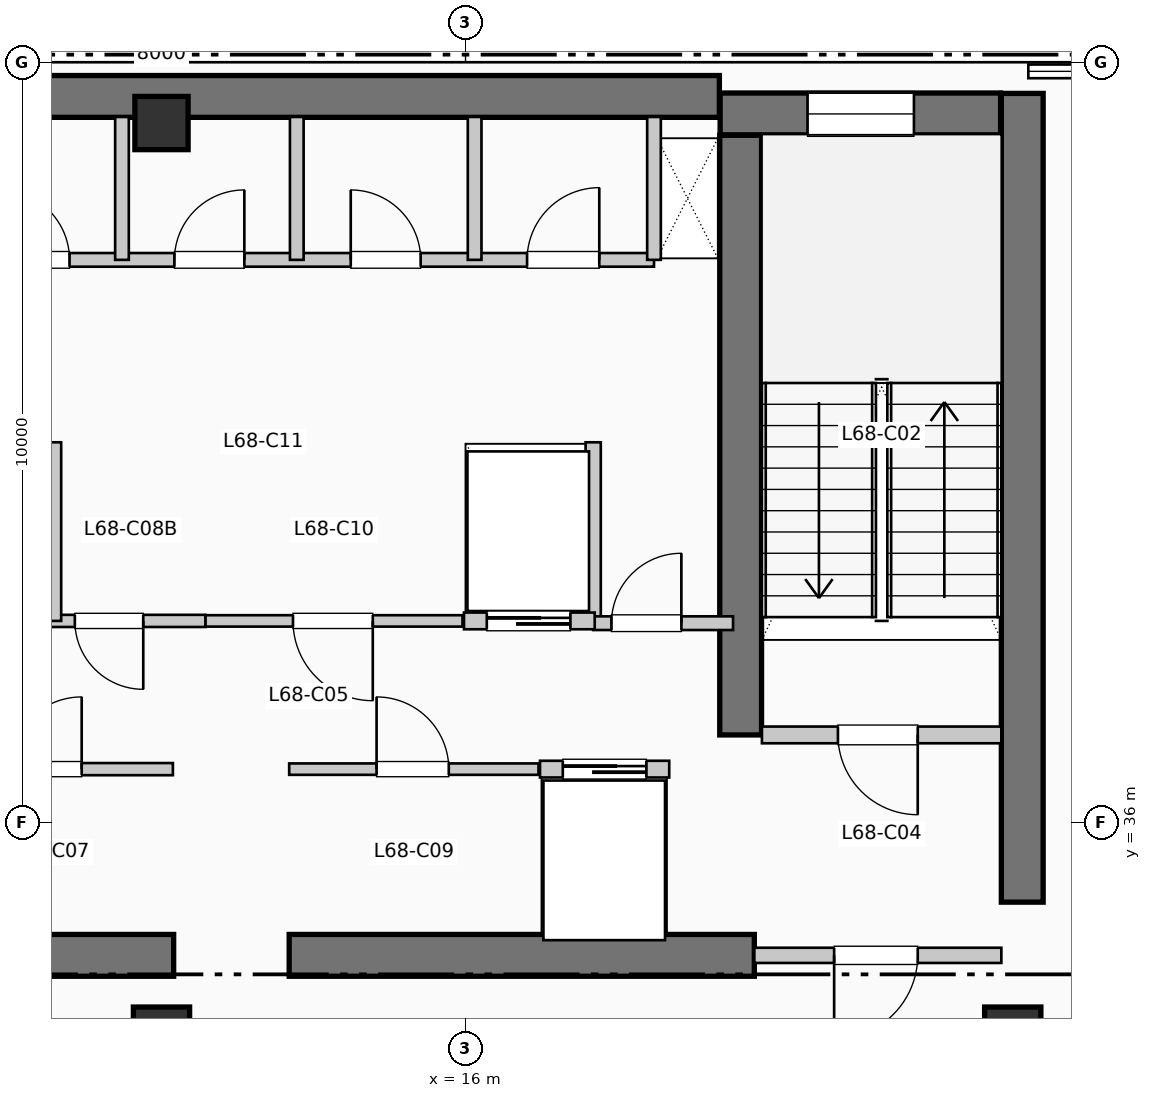
"""IFC4 building model, lengths in metres.
Left out: names, types, materials, properties, quantities, classifications, styles, units other than length and angle.
Written with IfcOpenShell. Run it as: python <this file> out.ifc"""

import sys

from ifc_helpers import new_model, si_unit, direction, frame, frame_2d, origin, origin_2d, place, context, subcontext, project, spatial, rectangle, extrude, element, fill, save


model = new_model("IFC4")
c1 = context("Model", 3, precision=1e-05, world=origin(), true_north=direction((0.0, 1.0)))
c2 = subcontext(c1, "Body", "Model", "MODEL_VIEW")
j1 = project(units=[si_unit("LENGTHUNIT", "METRE"), si_unit("PLANEANGLEUNIT", "RADIAN")], contexts=[c1])
p1 = place(None, origin())
s1 = spatial("IfcSite", under=j1, at=p1, CompositionType="ELEMENT")
p2 = place(p1, origin())
s2 = spatial("IfcBuilding", under=s1, at=p2, CompositionType="ELEMENT")
p3 = place(p2, frame((0.0, 0.0, 280.17)))
s3 = spatial("IfcBuildingStorey", under=s2, at=p3, CompositionType="ELEMENT", Elevation=280.17)
p4 = place(p3, frame((5.36, 45.55, 0.0), z_axis=(0.0, 0.0, 1.0), x_axis=(1.0, 0.0, 0.0)))
e1 = element("IfcWall", 1, at=p4, inside=s3, PredefinedType="SHEAR", context=c2, shape_type="SweptSolid", body=[
    extrude(rectangle(XDim=13.98, YDim=0.55, at=frame_2d((6.99, 0.0))), origin(), (0.0, 0.0, 1.0), 3.96),
])
p5 = place(p3, frame((23.325, 34.95, 0.0), z_axis=(0.0, 0.0, 1.0), x_axis=(0.0, 1.0, 0.0)))
e2 = element("IfcWall", 2, at=p5, inside=s3, PredefinedType="SHEAR", context=c2, shape_type="SweptSolid", body=[
    extrude(rectangle(XDim=10.64, YDim=0.55, at=frame_2d((5.32, 0.0))), origin(), (0.0, 0.0, 1.0), 3.96),
])
p6 = place(p3, frame((1.45, 34.25, 0.0), z_axis=(0.0, 0.0, 1.0), x_axis=(1.0, 0.0, 0.0)))
e3 = element("IfcWall", 3, at=p6, inside=s3, PredefinedType="SHEAR", context=c2, shape_type="SweptSolid", body=[
    extrude(rectangle(XDim=10.71, YDim=0.55, at=frame_2d((5.355, 0.0))), origin(), (0.0, 0.0, 1.0), 3.96),
])
p7 = place(p6, frame((7.25, 0.0, 0.0), z_axis=(0.0, 0.0, 1.0), x_axis=(-1.0, 0.0, 0.0)))
e4 = element("IfcOpeningElement", 4, at=p7, cuts=e3, PredefinedType="OPENING", context=c2, shape_type="SweptSolid", body=[
    extrude(rectangle(XDim=1.1, YDim=2.15, at=frame_2d((0.55, 1.075))), frame((0.0, 0.285, 0.0), z_axis=(0.0, -1.0, 0.0), x_axis=(1.0, 0.0, 0.0)), (0.0, 0.0, 1.0), 0.57),
])
p8 = place(p3, frame((13.68, 34.25, 0.0), z_axis=(0.0, 0.0, 1.0), x_axis=(1.0, 0.0, 0.0)))
e5 = element("IfcWall", 5, at=p8, inside=s3, PredefinedType="SHEAR", context=c2, shape_type="SweptSolid", body=[
    extrude(rectangle(XDim=6.12, YDim=0.55, at=frame_2d((3.06, 0.0))), origin(), (0.0, 0.0, 1.0), 3.96),
])
p9 = place(p3, frame((19.62, 37.15, 0.0), z_axis=(0.0, 0.0, 1.0), x_axis=(0.0, 1.0, 0.0)))
e6 = element("IfcWall", 6, at=p9, inside=s3, PredefinedType="SHEAR", context=c2, shape_type="SweptSolid", body=[
    extrude(rectangle(XDim=7.89, YDim=0.55, at=frame_2d((3.945, 0.0))), origin(), (0.0, 0.0, 1.0), 3.96),
])
p10 = place(p3, frame((19.35, 45.32, 0.0), z_axis=(0.0, 0.0, 1.0), x_axis=(1.0, 0.0, 0.0)))
e7 = element("IfcWall", 7, at=p10, inside=s3, PredefinedType="SHEAR", context=c2, shape_type="SweptSolid", body=[
    extrude(rectangle(XDim=3.69, YDim=0.55, at=frame_2d((1.845, 0.0))), origin(), (0.0, 0.0, 1.0), 3.96),
])
p11 = place(p10, frame((1.15, 0.0, 1.05)))
e8 = element("IfcOpeningElement", 8, at=p11, cuts=e7, PredefinedType="OPENING", context=c2, shape_type="SweptSolid", body=[
    extrude(rectangle(XDim=1.4, YDim=1.8, at=frame_2d((0.7, 0.9))), frame((0.0, 0.285, 0.0), z_axis=(0.0, -1.0, 0.0), x_axis=(1.0, 0.0, 0.0)), (0.0, 0.0, 1.0), 0.57),
])
p12 = place(p3, frame((12.0, 33.2, 0.0), z_axis=(0.0, 0.0, 1.0), x_axis=(1.0, 0.0, 0.0)))
e9 = element("IfcColumn", 9, at=p12, inside=s3, PredefinedType="COLUMN", context=c2, shape_type="SweptSolid", body=[
    extrude(rectangle(XDim=0.74, YDim=0.74, at=origin_2d()), origin(), (0.0, 0.0, 1.0), 3.96),
])
p13 = place(p3, frame((12.0, 45.2, 0.0), z_axis=(0.0, 0.0, 1.0), x_axis=(1.0, 0.0, 0.0)))
e10 = element("IfcColumn", 10, at=p13, inside=s3, PredefinedType="COLUMN", context=c2, shape_type="SweptSolid", body=[
    extrude(rectangle(XDim=0.7, YDim=0.7, at=origin_2d()), origin(), (0.0, 0.0, 1.0), 3.96),
])
p14 = place(p3, frame((23.2, 33.2, 0.0), z_axis=(0.0, 0.0, 1.0), x_axis=(1.0, 0.0, 0.0)))
e11 = element("IfcColumn", 11, at=p14, inside=s3, PredefinedType="COLUMN", context=c2, shape_type="SweptSolid", body=[
    extrude(rectangle(XDim=0.74, YDim=0.74, at=origin_2d()), origin(), (0.0, 0.0, 1.0), 3.96),
])
p15 = place(p3, frame((19.9, 37.15, 0.0), z_axis=(0.0, 0.0, 1.0), x_axis=(1.0, 0.0, 0.0)))
e12 = element("IfcWall", 12, at=p15, inside=s3, PredefinedType="PARTITIONING", context=c2, shape_type="SweptSolid", body=[
    extrude(rectangle(XDim=3.15, YDim=0.22, at=frame_2d((1.575, 0.0))), origin(), (0.0, 0.0, 1.0), 3.74),
])
p16 = place(p15, frame((2.05, 0.0, 0.0), z_axis=(0.0, 0.0, 1.0), x_axis=(-1.0, 0.0, 0.0)))
e13 = element("IfcOpeningElement", 13, at=p16, cuts=e12, PredefinedType="OPENING", context=c2, shape_type="SweptSolid", body=[
    extrude(rectangle(XDim=1.05, YDim=2.15, at=frame_2d((0.525, 1.075))), frame((0.0, 0.12, 0.0), z_axis=(0.0, -1.0, 0.0), x_axis=(1.0, 0.0, 0.0)), (0.0, 0.0, 1.0), 0.24),
])
p17 = place(p3, frame((19.8, 34.25, 0.0), z_axis=(0.0, 0.0, 1.0), x_axis=(1.0, 0.0, 0.0)))
e14 = element("IfcWall", 14, at=p17, inside=s3, PredefinedType="PARTITIONING", context=c2, shape_type="SweptSolid", body=[
    extrude(rectangle(XDim=3.25, YDim=0.2, at=frame_2d((1.625, 0.0))), origin(), (0.0, 0.0, 1.0), 3.74),
])
p18 = place(p17, frame((2.15, 0.0, 0.0), z_axis=(0.0, 0.0, 1.0), x_axis=(-1.0, 0.0, 0.0)))
e15 = element("IfcOpeningElement", 15, at=p18, cuts=e14, PredefinedType="OPENING", context=c2, shape_type="SweptSolid", body=[
    extrude(rectangle(XDim=1.1, YDim=2.15, at=frame_2d((0.55, 1.075))), frame((0.0, 0.11, 0.0), z_axis=(0.0, -1.0, 0.0), x_axis=(1.0, 0.0, 0.0)), (0.0, 0.0, 1.0), 0.22),
])
p19 = place(p3, frame((17.68, 38.65, 0.0), z_axis=(0.0, 0.0, 1.0), x_axis=(0.0, 1.0, 0.0)))
e16 = element("IfcWall", 16, at=p19, inside=s3, PredefinedType="PARTITIONING", context=c2, shape_type="SweptSolid", body=[
    extrude(rectangle(XDim=2.35, YDim=0.2, at=frame_2d((1.175, 0.0))), origin(), (0.0, 0.0, 1.0), 3.74),
])
p20 = place(p3, frame((17.68, 38.62, 0.0), z_axis=(0.0, 0.0, 1.0), x_axis=(1.0, 0.0, 0.0)))
e17 = element("IfcWall", 17, at=p20, inside=s3, PredefinedType="PARTITIONING", context=c2, shape_type="SweptSolid", body=[
    extrude(rectangle(XDim=1.84, YDim=0.18, at=frame_2d((0.92, 0.0))), origin(), (0.0, 0.0, 1.0), 3.74),
])
p21 = place(p20, frame((0.24, 0.0, 0.0)))
e18 = element("IfcOpeningElement", 18, at=p21, cuts=e17, PredefinedType="OPENING", context=c2, shape_type="SweptSolid", body=[
    extrude(rectangle(XDim=0.92, YDim=2.1, at=frame_2d((0.46, 1.05))), frame((0.0, 0.1, 0.0), z_axis=(0.0, -1.0, 0.0), x_axis=(1.0, 0.0, 0.0)), (0.0, 0.0, 1.0), 0.2),
])
p22 = place(p3, frame((8.9, 36.7, 0.0), z_axis=(0.0, 0.0, 1.0), x_axis=(1.0, 0.0, 0.0)))
e19 = element("IfcWall", 19, at=p22, inside=s3, PredefinedType="PARTITIONING", context=c2, shape_type="SweptSolid", body=[
    extrude(rectangle(XDim=3.25, YDim=0.16, at=frame_2d((1.625, 0.0))), origin(), (0.0, 0.0, 1.0), 3.74),
])
p23 = place(p22, frame((1.1, 0.0, 0.0)))
e20 = element("IfcOpeningElement", 20, at=p23, cuts=e19, PredefinedType="OPENING", context=c2, shape_type="SweptSolid", body=[
    extrude(rectangle(XDim=0.95, YDim=2.15, at=frame_2d((0.475, 1.075))), frame((0.0, 0.09, 0.0), z_axis=(0.0, -1.0, 0.0), x_axis=(1.0, 0.0, 0.0)), (0.0, 0.0, 1.0), 0.18),
])
p24 = place(p3, frame((9.16, 38.65, 0.0), z_axis=(0.0, 0.0, 1.0), x_axis=(1.0, 0.0, 0.0)))
e21 = element("IfcWall", 21, at=p24, inside=s3, PredefinedType="PARTITIONING", context=c2, shape_type="SweptSolid", body=[
    extrude(rectangle(XDim=3.42, YDim=0.16, at=frame_2d((1.71, 0.0))), origin(), (0.0, 0.0, 1.0), 3.74),
])
p25 = place(p24, frame((1.18, 0.0, 0.0), z_axis=(0.0, 0.0, 1.0), x_axis=(-1.0, 0.0, 0.0)))
e22 = element("IfcOpeningElement", 22, at=p25, cuts=e21, PredefinedType="OPENING", context=c2, shape_type="SweptSolid", body=[
    extrude(rectangle(XDim=0.9, YDim=2.15, at=frame_2d((0.45, 1.075))), frame((0.0, 0.09, 0.0), z_axis=(0.0, -1.0, 0.0), x_axis=(1.0, 0.0, 0.0)), (0.0, 0.0, 1.0), 0.18),
])
p26 = place(p24, frame((2.6, 0.0, 0.0), z_axis=(0.0, 0.0, 1.0), x_axis=(-1.0, 0.0, 0.0)))
e23 = element("IfcOpeningElement", 23, at=p26, cuts=e21, PredefinedType="OPENING", context=c2, shape_type="SweptSolid", body=[
    extrude(rectangle(XDim=0.9, YDim=2.15, at=frame_2d((0.45, 1.075))), frame((0.0, 0.09, 0.0), z_axis=(0.0, -1.0, 0.0), x_axis=(1.0, 0.0, 0.0)), (0.0, 0.0, 1.0), 0.18),
])
p27 = place(p3, frame((10.6, 38.65, 0.0), z_axis=(0.0, 0.0, 1.0), x_axis=(0.0, 1.0, 0.0)))
e24 = element("IfcWall", 24, at=p27, inside=s3, PredefinedType="PARTITIONING", context=c2, shape_type="SweptSolid", body=[
    extrude(rectangle(XDim=2.35, YDim=0.16, at=frame_2d((1.175, 0.0))), origin(), (0.0, 0.0, 1.0), 3.74),
])
p28 = place(p3, frame((13.68, 36.7, 0.0), z_axis=(0.0, 0.0, 1.0), x_axis=(1.0, 0.0, 0.0)))
e25 = element("IfcWall", 25, at=p28, inside=s3, PredefinedType="PARTITIONING", context=c2, shape_type="SweptSolid", body=[
    extrude(rectangle(XDim=3.28, YDim=0.15, at=frame_2d((1.64, 0.0))), origin(), (0.0, 0.0, 1.0), 3.74),
])
p29 = place(p28, frame((1.15, 0.0, 0.0)))
e26 = element("IfcOpeningElement", 26, at=p29, cuts=e25, PredefinedType="OPENING", context=c2, shape_type="SweptSolid", body=[
    extrude(rectangle(XDim=0.95, YDim=2.15, at=frame_2d((0.475, 1.075))), frame((0.0, 0.085, 0.0), z_axis=(0.0, -1.0, 0.0), x_axis=(1.0, 0.0, 0.0)), (0.0, 0.0, 1.0), 0.17),
])
p30 = place(p3, frame((12.58, 38.65, 0.0), z_axis=(0.0, 0.0, 1.0), x_axis=(1.0, 0.0, 0.0)))
e27 = element("IfcWall", 27, at=p30, inside=s3, PredefinedType="PARTITIONING", context=c2, shape_type="SweptSolid", body=[
    extrude(rectangle(XDim=3.38, YDim=0.15, at=frame_2d((1.69, 0.0))), origin(), (0.0, 0.0, 1.0), 3.74),
])
p31 = place(p30, frame((2.2, 0.0, 0.0), z_axis=(0.0, 0.0, 1.0), x_axis=(-1.0, 0.0, 0.0)))
e28 = element("IfcOpeningElement", 28, at=p31, cuts=e27, PredefinedType="OPENING", context=c2, shape_type="SweptSolid", body=[
    extrude(rectangle(XDim=1.05, YDim=2.15, at=frame_2d((0.525, 1.075))), frame((0.0, 0.085, 0.0), z_axis=(0.0, -1.0, 0.0), x_axis=(1.0, 0.0, 0.0)), (0.0, 0.0, 1.0), 0.17),
])
p32 = place(p3, frame((16.98, 36.7, 0.0), z_axis=(0.0, 0.0, 1.0), x_axis=(1.0, 0.0, 0.0)))
e29 = element("IfcWall", 29, at=p32, inside=s3, PredefinedType="PARTITIONING", context=c2, shape_type="SweptSolid", body=[
    extrude(rectangle(XDim=1.7, YDim=0.22, at=frame_2d((0.85, 0.0))), origin(), (0.0, 0.0, 1.0), 3.74),
])
p33 = place(p32, frame((0.3, 0.0, 0.0)))
e30 = element("IfcOpeningElement", 30, at=p33, cuts=e29, PredefinedType="OPENING", context=c2, shape_type="SweptSolid", body=[
    extrude(rectangle(XDim=1.1, YDim=2.2, at=frame_2d((0.55, 1.1))), frame((0.0, 0.12, 0.0), z_axis=(0.0, -1.0, 0.0), x_axis=(1.0, 0.0, 0.0)), (0.0, 0.0, 1.0), 0.24),
])
p34 = place(p3, frame((15.98, 38.65, 0.0), z_axis=(0.0, 0.0, 1.0), x_axis=(1.0, 0.0, 0.0)))
e31 = element("IfcWall", 31, at=p34, inside=s3, PredefinedType="PARTITIONING", context=c2, shape_type="SweptSolid", body=[
    extrude(rectangle(XDim=1.72, YDim=0.22, at=frame_2d((0.86, 0.0))), origin(), (0.0, 0.0, 1.0), 3.74),
])
p35 = place(p34, frame((0.3, 0.0, 0.0)))
e32 = element("IfcOpeningElement", 32, at=p35, cuts=e31, PredefinedType="OPENING", context=c2, shape_type="SweptSolid", body=[
    extrude(rectangle(XDim=1.1, YDim=2.2, at=frame_2d((0.55, 1.1))), frame((0.0, 0.12, 0.0), z_axis=(0.0, -1.0, 0.0), x_axis=(1.0, 0.0, 0.0)), (0.0, 0.0, 1.0), 0.24),
])
p36 = place(p3, frame((9.15, 43.4, 0.0), z_axis=(0.0, 0.0, 1.0), x_axis=(1.0, 0.0, 0.0)))
e33 = element("IfcWall", 33, at=p36, inside=s3, PredefinedType="PLUMBINGWALL", context=c2, shape_type="SweptSolid", body=[
    extrude(rectangle(XDim=9.33, YDim=0.18, at=frame_2d((4.665, 0.0))), origin(), (0.0, 0.0, 1.0), 3.74),
])
p37 = place(p36, frame((0.72, 0.0, 0.0)))
e34 = element("IfcOpeningElement", 34, at=p37, cuts=e33, PredefinedType="OPENING", context=c2, shape_type="SweptSolid", body=[
    extrude(rectangle(XDim=0.92, YDim=2.1, at=frame_2d((0.46, 1.05))), frame((0.0, 0.1, 0.0), z_axis=(0.0, -1.0, 0.0), x_axis=(1.0, 0.0, 0.0)), (0.0, 0.0, 1.0), 0.2),
])
p38 = place(p36, frame((3.02, 0.0, 0.0)))
e35 = element("IfcOpeningElement", 35, at=p38, cuts=e33, PredefinedType="OPENING", context=c2, shape_type="SweptSolid", body=[
    extrude(rectangle(XDim=0.92, YDim=2.1, at=frame_2d((0.46, 1.05))), frame((0.0, 0.1, 0.0), z_axis=(0.0, -1.0, 0.0), x_axis=(1.0, 0.0, 0.0)), (0.0, 0.0, 1.0), 0.2),
])
p39 = place(p36, frame((5.34, 0.0, 0.0)))
e36 = element("IfcOpeningElement", 36, at=p39, cuts=e33, PredefinedType="OPENING", context=c2, shape_type="SweptSolid", body=[
    extrude(rectangle(XDim=0.92, YDim=2.1, at=frame_2d((0.46, 1.05))), frame((0.0, 0.1, 0.0), z_axis=(0.0, -1.0, 0.0), x_axis=(1.0, 0.0, 0.0)), (0.0, 0.0, 1.0), 0.2),
])
p40 = place(p36, frame((7.66, 0.0, 0.0)))
e37 = element("IfcOpeningElement", 37, at=p40, cuts=e33, PredefinedType="OPENING", context=c2, shape_type="SweptSolid", body=[
    extrude(rectangle(XDim=0.95, YDim=2.1, at=frame_2d((0.475, 1.05))), frame((0.0, 0.1, 0.0), z_axis=(0.0, -1.0, 0.0), x_axis=(1.0, 0.0, 0.0)), (0.0, 0.0, 1.0), 0.2),
])
for number, where, z_axis, x_axis in (
    (38, (18.48, 43.4, 0.0), (0.0, 0.0, 1.0), (0.0, 1.0, 0.0)),
    (39, (11.48, 43.4, 0.0), (0.0, 0.0, 1.0), (0.0, 1.0, 0.0)),
    (40, (13.78, 43.4, 0.0), (0.0, 0.0, 1.0), (0.0, 1.0, 0.0)),
    (41, (16.12, 43.4, 0.0), (0.0, 0.0, 1.0), (0.0, 1.0, 0.0)),
):
    element("IfcWall", number, at=place(p3, frame(where, z_axis=z_axis, x_axis=x_axis)), inside=s3, PredefinedType="PLUMBINGWALL", context=c2, shape_type="SweptSolid", body=[
        extrude(rectangle(XDim=1.88, YDim=0.18, at=frame_2d((0.94, 0.0))), origin(), (0.0, 0.0, 1.0), 3.74),
    ])
p41 = place(p11, origin())
e42 = element("IfcWindow", 42, at=p41, inside=s3, PartitioningType="SINGLE_PANEL", PredefinedType="WINDOW", context=c2, shape_type="SweptSolid", body=[
    extrude(rectangle(XDim=1.4, YDim=1.8, at=frame_2d((0.7, 0.9))), frame((0.0, 0.03, 0.0), z_axis=(0.0, -1.0, 0.0), x_axis=(1.0, 0.0, 0.0)), (0.0, 0.0, 1.0), 0.06),
])
fill(e8, e42)
p42 = place(p16, origin())
e43 = element("IfcDoor", 43, at=p42, inside=s3, OperationType="SINGLE_SWING_RIGHT", PredefinedType="DOOR", context=c2, shape_type="SweptSolid", body=[
    extrude(rectangle(XDim=1.05, YDim=2.15, at=frame_2d((0.525, 1.075))), frame((0.0, 0.025, 0.0), z_axis=(0.0, -1.0, 0.0), x_axis=(1.0, 0.0, 0.0)), (0.0, 0.0, 1.0), 0.05),
])
fill(e13, e43)
p43 = place(p18, origin())
e44 = element("IfcDoor", 44, at=p43, inside=s3, OperationType="SINGLE_SWING_LEFT", PredefinedType="DOOR", context=c2, shape_type="SweptSolid", body=[
    extrude(rectangle(XDim=1.1, YDim=2.15, at=frame_2d((0.55, 1.075))), frame((0.0, 0.025, 0.0), z_axis=(0.0, -1.0, 0.0), x_axis=(1.0, 0.0, 0.0)), (0.0, 0.0, 1.0), 0.05),
])
fill(e15, e44)
p44 = place(p21, origin())
e45 = element("IfcDoor", 45, at=p44, inside=s3, OperationType="SINGLE_SWING_RIGHT", PredefinedType="DOOR", context=c2, shape_type="SweptSolid", body=[
    extrude(rectangle(XDim=0.92, YDim=2.1, at=frame_2d((0.46, 1.05))), frame((0.0, 0.025, 0.0), z_axis=(0.0, -1.0, 0.0), x_axis=(1.0, 0.0, 0.0)), (0.0, 0.0, 1.0), 0.05),
])
fill(e18, e45)
p45 = place(p23, origin())
e46 = element("IfcDoor", 46, at=p45, inside=s3, OperationType="SINGLE_SWING_RIGHT", PredefinedType="DOOR", context=c2, shape_type="SweptSolid", body=[
    extrude(rectangle(XDim=0.95, YDim=2.15, at=frame_2d((0.475, 1.075))), frame((0.0, 0.025, 0.0), z_axis=(0.0, -1.0, 0.0), x_axis=(1.0, 0.0, 0.0)), (0.0, 0.0, 1.0), 0.05),
])
fill(e20, e46)
p46 = place(p26, origin())
e47 = element("IfcDoor", 47, at=p46, inside=s3, OperationType="SINGLE_SWING_RIGHT", PredefinedType="DOOR", context=c2, shape_type="SweptSolid", body=[
    extrude(rectangle(XDim=0.9, YDim=2.15, at=frame_2d((0.45, 1.075))), frame((0.0, 0.025, 0.0), z_axis=(0.0, -1.0, 0.0), x_axis=(1.0, 0.0, 0.0)), (0.0, 0.0, 1.0), 0.05),
])
fill(e23, e47)
p47 = place(p29, origin())
e48 = element("IfcDoor", 48, at=p47, inside=s3, OperationType="SINGLE_SWING_LEFT", PredefinedType="DOOR", context=c2, shape_type="SweptSolid", body=[
    extrude(rectangle(XDim=0.95, YDim=2.15, at=frame_2d((0.475, 1.075))), frame((0.0, 0.025, 0.0), z_axis=(0.0, -1.0, 0.0), x_axis=(1.0, 0.0, 0.0)), (0.0, 0.0, 1.0), 0.05),
])
fill(e26, e48)
p48 = place(p31, origin())
e49 = element("IfcDoor", 49, at=p48, inside=s3, OperationType="SINGLE_SWING_RIGHT", PredefinedType="DOOR", context=c2, shape_type="SweptSolid", body=[
    extrude(rectangle(XDim=1.05, YDim=2.15, at=frame_2d((0.525, 1.075))), frame((0.0, 0.025, 0.0), z_axis=(0.0, -1.0, 0.0), x_axis=(1.0, 0.0, 0.0)), (0.0, 0.0, 1.0), 0.05),
])
fill(e28, e49)
p49 = place(p33, origin())
e50 = element("IfcDoor", 50, at=p49, inside=s3, OperationType="SLIDING_TO_LEFT", PredefinedType="DOOR", context=c2, shape_type="SweptSolid", body=[
    extrude(rectangle(XDim=1.1, YDim=2.2, at=frame_2d((0.55, 1.1))), frame((0.0, 0.025, 0.0), z_axis=(0.0, -1.0, 0.0), x_axis=(1.0, 0.0, 0.0)), (0.0, 0.0, 1.0), 0.05),
])
fill(e30, e50)
p50 = place(p35, origin())
e51 = element("IfcDoor", 51, at=p50, inside=s3, OperationType="SLIDING_TO_LEFT", PredefinedType="DOOR", context=c2, shape_type="SweptSolid", body=[
    extrude(rectangle(XDim=1.1, YDim=2.2, at=frame_2d((0.55, 1.1))), frame((0.0, 0.025, 0.0), z_axis=(0.0, -1.0, 0.0), x_axis=(1.0, 0.0, 0.0)), (0.0, 0.0, 1.0), 0.05),
])
fill(e32, e51)
p51 = place(p37, origin())
e52 = element("IfcDoor", 52, at=p51, inside=s3, OperationType="SINGLE_SWING_LEFT", PredefinedType="DOOR", context=c2, shape_type="SweptSolid", body=[
    extrude(rectangle(XDim=0.92, YDim=2.1, at=frame_2d((0.46, 1.05))), frame((0.0, 0.025, 0.0), z_axis=(0.0, -1.0, 0.0), x_axis=(1.0, 0.0, 0.0)), (0.0, 0.0, 1.0), 0.05),
])
fill(e34, e52)
p52 = place(p38, origin())
e53 = element("IfcDoor", 53, at=p52, inside=s3, OperationType="SINGLE_SWING_RIGHT", PredefinedType="DOOR", context=c2, shape_type="SweptSolid", body=[
    extrude(rectangle(XDim=0.92, YDim=2.1, at=frame_2d((0.46, 1.05))), frame((0.0, 0.025, 0.0), z_axis=(0.0, -1.0, 0.0), x_axis=(1.0, 0.0, 0.0)), (0.0, 0.0, 1.0), 0.05),
])
fill(e35, e53)
p53 = place(p39, origin())
e54 = element("IfcDoor", 54, at=p53, inside=s3, OperationType="SINGLE_SWING_LEFT", PredefinedType="DOOR", context=c2, shape_type="SweptSolid", body=[
    extrude(rectangle(XDim=0.92, YDim=2.1, at=frame_2d((0.46, 1.05))), frame((0.0, 0.025, 0.0), z_axis=(0.0, -1.0, 0.0), x_axis=(1.0, 0.0, 0.0)), (0.0, 0.0, 1.0), 0.05),
])
fill(e36, e54)
p54 = place(p40, origin())
e55 = element("IfcDoor", 55, at=p54, inside=s3, OperationType="SINGLE_SWING_RIGHT", PredefinedType="DOOR", context=c2, shape_type="SweptSolid", body=[
    extrude(rectangle(XDim=0.95, YDim=2.1, at=frame_2d((0.475, 1.05))), frame((0.0, 0.025, 0.0), z_axis=(0.0, -1.0, 0.0), x_axis=(1.0, 0.0, 0.0)), (0.0, 0.0, 1.0), 0.05),
])
fill(e37, e55)
save(model, sys.argv[1])
